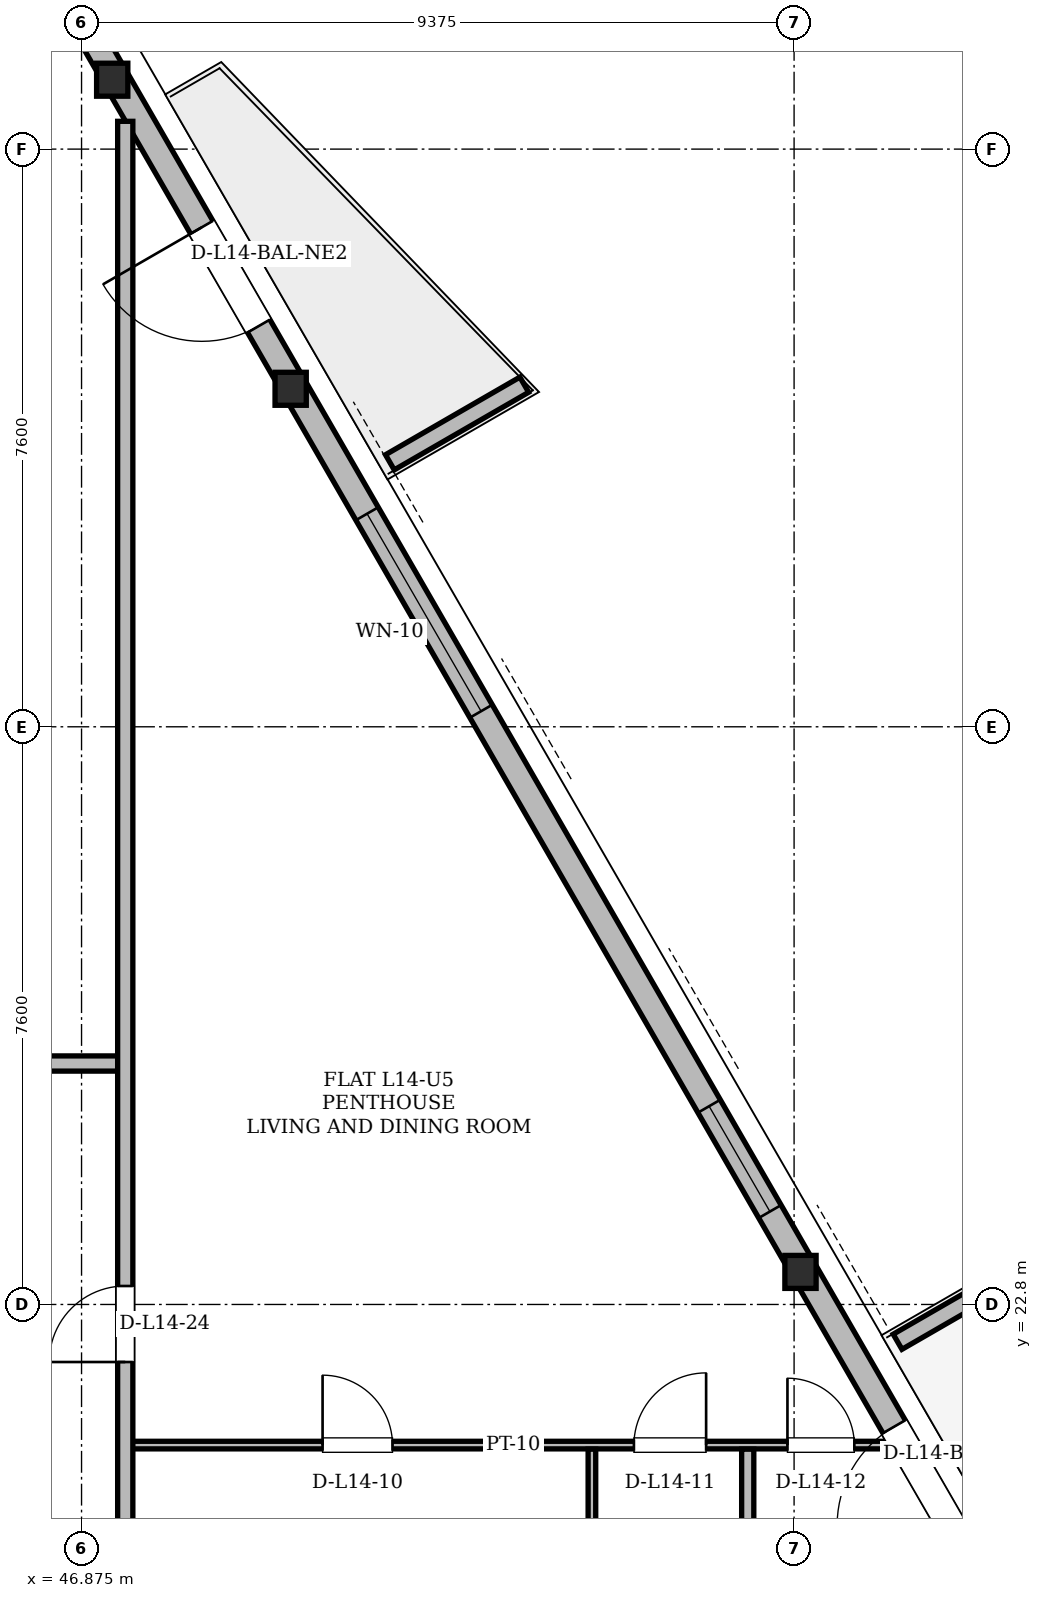
"""IFC4 building model, lengths in metres.
Left out: names, types, materials, properties, quantities, classifications, styles, units other than length and angle.
Written with IfcOpenShell. Run it as: python <this file> out.ifc"""

import sys

from ifc_helpers import new_model, si_unit, direction, frame, frame_2d, origin, origin_2d, place, context, subcontext, project, spatial, polyline, rectangle, i_section, outline, extrude, element, fill, save


model = new_model("IFC4")
c1 = context("Model", 3, precision=1e-05, world=origin(), true_north=direction((0.0, 1.0)))
c2 = subcontext(c1, "Body", "Model", "MODEL_VIEW")
j1 = project(units=[si_unit("LENGTHUNIT", "METRE"), si_unit("PLANEANGLEUNIT", "RADIAN")], contexts=[c1])
p1 = place(None, origin())
s1 = spatial("IfcSite", under=j1, at=p1, CompositionType="ELEMENT")
p2 = place(p1, origin())
s2 = spatial("IfcBuilding", under=s1, at=p2, CompositionType="ELEMENT")
p3 = place(p2, frame((0.0, 0.0, 56.1)))
s3 = spatial("IfcBuildingStorey", under=s2, at=p3, CompositionType="ELEMENT", Elevation=56.1)
for number, where, z_axis, x_axis in (
    (1, (56.372, 23.26, 0.004), (-0.021, -0.018, 1.0), (0.65, -0.76, 0.0)),
    (2, (49.673, 34.863, 0.004), (-0.026, -0.009, 1.0), (0.335, -0.942, 0.0)),
    (3, (47.329, 38.924, 0.004), (-0.028, -0.006, 1.0), (0.214, -0.977, 0.0)),
):
    element("IfcColumn", number, at=place(p3, frame(where, z_axis=z_axis, x_axis=x_axis)), inside=s3, PredefinedType="COLUMN", context=c2, shape_type="SweptSolid", body=[
        extrude(i_section(OverallWidth=0.411, OverallDepth=0.434, WebThickness=0.036, FlangeThickness=0.057, at=origin_2d()), origin(), (0.0, 0.0, 1.0), 3.593),
    ])
p4 = place(p3, frame((61.396, 14.559, 0.0), z_axis=(0.0, 0.0, 1.0), x_axis=(-0.500002389912, 0.866024023964, 0.0)))
e4 = element("IfcWall", 4, at=p4, inside=s3, PredefinedType="SOLIDWALL", context=c2, shape_type="SweptSolid", body=[
    extrude(rectangle(XDim=33.494, YDim=0.34, at=frame_2d((16.747, 0.0))), origin(), (0.0, 0.0, 1.0), 2.494),
])
p5 = place(p4, frame((6.159, 0.0, 0.0)))
e5 = element("IfcOpeningElement", 5, at=p5, cuts=e4, PredefinedType="OPENING", context=c2, shape_type="SweptSolid", body=[
    extrude(rectangle(XDim=1.5, YDim=2.2, at=frame_2d((0.75, 1.1))), frame((0.0, 0.17, 0.0), z_axis=(0.0, -1.0, 0.0), x_axis=(1.0, 0.0, 0.0)), (0.0, 0.0, 1.0), 0.34),
])
p6 = place(p4, frame((24.379, 0.0, 0.0)))
e6 = element("IfcOpeningElement", 6, at=p6, cuts=e4, PredefinedType="OPENING", context=c2, shape_type="SweptSolid", body=[
    extrude(rectangle(XDim=1.5, YDim=2.2, at=frame_2d((0.75, 1.1))), frame((0.0, 0.17, 0.0), z_axis=(0.0, -1.0, 0.0), x_axis=(1.0, 0.0, 0.0)), (0.0, 0.0, 1.0), 0.34),
])
p7 = place(p4, frame((0.92, 0.0, 0.85)))
e7 = element("IfcOpeningElement", 7, at=p7, cuts=e4, PredefinedType="OPENING", context=c2, shape_type="SweptSolid", body=[
    extrude(rectangle(XDim=1.2, YDim=1.48, at=frame_2d((0.6, 0.74))), frame((0.0, 0.17, 0.0), z_axis=(0.0, -1.0, 0.0), x_axis=(1.0, 0.0, 0.0)), (0.0, 0.0, 1.0), 0.34),
])
p8 = place(p4, frame((10.928, 0.0, 0.85)))
e8 = element("IfcOpeningElement", 8, at=p8, cuts=e4, PredefinedType="OPENING", context=c2, shape_type="SweptSolid", body=[
    extrude(rectangle(XDim=1.6, YDim=1.534, at=frame_2d((0.8, 0.767))), frame((0.0, 0.17, 0.0), z_axis=(0.0, -1.0, 0.0), x_axis=(1.0, 0.0, 0.0)), (0.0, 0.0, 1.0), 0.34),
])
p9 = place(p4, frame((18.529, 0.0, 0.85)))
e9 = element("IfcOpeningElement", 9, at=p9, cuts=e4, PredefinedType="OPENING", context=c2, shape_type="SweptSolid", body=[
    extrude(rectangle(XDim=3.0, YDim=1.534, at=frame_2d((1.5, 0.767))), frame((0.0, 0.17, 0.0), z_axis=(0.0, -1.0, 0.0), x_axis=(1.0, 0.0, 0.0)), (0.0, 0.0, 1.0), 0.34),
])
p10 = place(p4, frame((3.162, 0.0, 0.85)))
e10 = element("IfcOpeningElement", 10, at=p10, cuts=e4, PredefinedType="OPENING", context=c2, shape_type="SweptSolid", body=[
    extrude(rectangle(XDim=1.2, YDim=1.48, at=frame_2d((0.6, 0.74))), frame((0.0, 0.17, 0.0), z_axis=(0.0, -1.0, 0.0), x_axis=(1.0, 0.0, 0.0)), (0.0, 0.0, 1.0), 0.34),
])
for number, where, z_axis, x_axis in (
    (11, (57.612, 22.309, 0.0), (0.0, 0.0, 1.0), (0.866, 0.5, 0.0)),
    (12, (50.932, 33.879, 0.0), (0.0, 0.0, 1.0), (0.866, 0.5, 0.0)),
):
    element("IfcWall", number, at=place(p3, frame(where, z_axis=z_axis, x_axis=x_axis)), inside=s3, PredefinedType="PARAPET", context=c2, shape_type="SweptSolid", body=[
        extrude(outline(polyline([(0.0, 0.0), (2.042, 0.0), (2.042, 1.1), (0.0, 1.32), (0.0, 0.0)])), frame((0.0, 0.115, 0.0), z_axis=(0.0, -1.0, 0.0), x_axis=(1.0, 0.0, 0.0)), (0.0, 0.0, 1.0), 0.23),
    ])
p11 = place(p3, frame((47.4, 20.95, 0.0), z_axis=(0.0, 0.0, 1.0), x_axis=(1.0, 0.0, 0.0)))
e13 = element("IfcWall", 13, at=p11, inside=s3, PredefinedType="PARTITIONING", context=c2, shape_type="SweptSolid", body=[
    extrude(rectangle(XDim=10.105, YDim=0.1, at=frame_2d((5.052, 0.0))), origin(), (0.0, 0.0, 1.0), 3.36),
])
p12 = place(p11, frame((2.646, 0.0, 0.0)))
e14 = element("IfcOpeningElement", 14, at=p12, cuts=e13, PredefinedType="OPENING", context=c2, shape_type="SweptSolid", body=[
    extrude(rectangle(XDim=0.92, YDim=2.12, at=frame_2d((0.46, 1.06))), frame((0.0, 0.05, 0.0), z_axis=(0.0, -1.0, 0.0), x_axis=(1.0, 0.0, 0.0)), (0.0, 0.0, 1.0), 0.1),
])
p13 = place(p11, frame((6.743, 0.0, 0.0)))
e15 = element("IfcOpeningElement", 15, at=p13, cuts=e13, PredefinedType="OPENING", context=c2, shape_type="SweptSolid", body=[
    extrude(rectangle(XDim=0.95, YDim=2.1, at=frame_2d((0.475, 1.05))), frame((0.0, 0.05, 0.0), z_axis=(0.0, -1.0, 0.0), x_axis=(1.0, 0.0, 0.0)), (0.0, 0.0, 1.0), 0.1),
])
p14 = place(p11, frame((8.763, 0.0, 0.0)))
e16 = element("IfcOpeningElement", 16, at=p14, cuts=e13, PredefinedType="OPENING", context=c2, shape_type="SweptSolid", body=[
    extrude(rectangle(XDim=0.88, YDim=2.08, at=frame_2d((0.44, 1.04))), frame((0.0, 0.05, 0.0), z_axis=(0.0, -1.0, 0.0), x_axis=(1.0, 0.0, 0.0)), (0.0, 0.0, 1.0), 0.1),
])
p15 = place(p3, frame((27.55, 25.97, 0.0), z_axis=(0.0, 0.0, 1.0), x_axis=(1.0, 0.0, 0.0)))
e17 = element("IfcWall", 17, at=p15, inside=s3, PredefinedType="PARTITIONING", context=c2, shape_type="SweptSolid", body=[
    extrude(rectangle(XDim=19.9, YDim=0.2, at=frame_2d((9.95, 0.0))), origin(), (0.0, 0.0, 1.0), 2.738),
])
p16 = place(p15, frame((2.077, 0.0, 0.0)))
e18 = element("IfcOpeningElement", 18, at=p16, cuts=e17, PredefinedType="OPENING", context=c2, shape_type="SweptSolid", body=[
    extrude(rectangle(XDim=1.0, YDim=2.18, at=frame_2d((0.5, 1.09))), frame((0.0, 0.1, 0.0), z_axis=(0.0, -1.0, 0.0), x_axis=(1.0, 0.0, 0.0)), (0.0, 0.0, 1.0), 0.2),
])
p17 = place(p15, frame((7.8, 0.0, 0.0)))
e19 = element("IfcOpeningElement", 19, at=p17, cuts=e17, PredefinedType="OPENING", context=c2, shape_type="SweptSolid", body=[
    extrude(rectangle(XDim=1.3, YDim=2.2, at=frame_2d((0.65, 1.1))), frame((0.0, 0.1, 0.0), z_axis=(0.0, -1.0, 0.0), x_axis=(1.0, 0.0, 0.0)), (0.0, 0.0, 1.0), 0.2),
])
p18 = place(p3, frame((47.45, 11.054, 0.0), z_axis=(0.0, 0.0, 1.0), x_axis=(0.0, 1.0, 0.0)))
e20 = element("IfcWall", 20, at=p18, inside=s3, PredefinedType="PARTITIONING", context=c2, shape_type="SweptSolid", body=[
    extrude(rectangle(XDim=27.312, YDim=0.2, at=frame_2d((13.656, 0.0))), origin(), (0.0, 0.0, 1.0), 2.494),
])
p19 = place(p18, frame((10.989, 0.0, 0.0)))
e21 = element("IfcOpeningElement", 21, at=p19, cuts=e20, PredefinedType="OPENING", context=c2, shape_type="SweptSolid", body=[
    extrude(rectangle(XDim=1.0, YDim=2.18, at=frame_2d((0.5, 1.09))), frame((0.0, 0.1, 0.0), z_axis=(0.0, -1.0, 0.0), x_axis=(1.0, 0.0, 0.0)), (0.0, 0.0, 1.0), 0.2),
])
p20 = place(p3, frame((53.59, 16.704, 0.0), z_axis=(0.0, 0.0, 1.0), x_axis=(0.0, 1.0, 0.0)))
e22 = element("IfcWall", 22, at=p20, inside=s3, PredefinedType="PARTITIONING", context=c2, shape_type="SweptSolid", body=[
    extrude(rectangle(XDim=4.192, YDim=0.1, at=frame_2d((2.096, 0.0))), origin(), (0.0, 0.0, 1.0), 3.36),
])
p21 = place(p3, frame((55.64, 16.704, 0.0), z_axis=(0.0, 0.0, 1.0), x_axis=(0.0, 1.0, 0.0)))
e23 = element("IfcWall", 23, at=p21, inside=s3, PredefinedType="PARTITIONING", context=c2, shape_type="SweptSolid", body=[
    extrude(rectangle(XDim=4.192, YDim=0.16, at=frame_2d((2.096, 0.0))), origin(), (0.0, 0.0, 1.0), 2.946),
])
p22 = place(p5, origin())
e24 = element("IfcDoor", 24, at=p22, inside=s3, OperationType="SINGLE_SWING_LEFT", PredefinedType="DOOR", context=c2, shape_type="SweptSolid", body=[
    extrude(rectangle(XDim=1.5, YDim=2.2, at=frame_2d((0.75, 1.1))), frame((0.0, 0.025, 0.0), z_axis=(0.0, -1.0, 0.0), x_axis=(1.0, 0.0, 0.0)), (0.0, 0.0, 1.0), 0.05),
])
fill(e5, e24)
p23 = place(p6, origin())
e25 = element("IfcDoor", 25, at=p23, inside=s3, OperationType="SINGLE_SWING_RIGHT", PredefinedType="DOOR", context=c2, shape_type="SweptSolid", body=[
    extrude(rectangle(XDim=1.5, YDim=2.2, at=frame_2d((0.75, 1.1))), frame((0.0, 0.025, 0.0), z_axis=(0.0, -1.0, 0.0), x_axis=(1.0, 0.0, 0.0)), (0.0, 0.0, 1.0), 0.05),
])
fill(e6, e25)
p24 = place(p8, origin())
e26 = element("IfcWindow", 26, at=p24, inside=s3, PartitioningType="SINGLE_PANEL", PredefinedType="WINDOW", context=c2, shape_type="SweptSolid", body=[
    extrude(rectangle(XDim=1.6, YDim=1.534, at=frame_2d((0.8, 0.767))), frame((0.0, 0.03, 0.0), z_axis=(0.0, -1.0, 0.0), x_axis=(1.0, 0.0, 0.0)), (0.0, 0.0, 1.0), 0.06),
])
fill(e8, e26)
p25 = place(p9, origin())
e27 = element("IfcWindow", 27, at=p25, inside=s3, PartitioningType="SINGLE_PANEL", PredefinedType="WINDOW", context=c2, shape_type="SweptSolid", body=[
    extrude(rectangle(XDim=3.0, YDim=1.534, at=frame_2d((1.5, 0.767))), frame((0.0, 0.03, 0.0), z_axis=(0.0, -1.0, 0.0), x_axis=(1.0, 0.0, 0.0)), (0.0, 0.0, 1.0), 0.06),
])
fill(e9, e27)
p26 = place(p12, origin())
e28 = element("IfcDoor", 28, at=p26, inside=s3, OperationType="SINGLE_SWING_LEFT", PredefinedType="DOOR", context=c2, shape_type="SweptSolid", body=[
    extrude(rectangle(XDim=0.92, YDim=2.12, at=frame_2d((0.46, 1.06))), frame((0.0, 0.025, 0.0), z_axis=(0.0, -1.0, 0.0), x_axis=(1.0, 0.0, 0.0)), (0.0, 0.0, 1.0), 0.05),
])
fill(e14, e28)
p27 = place(p13, origin())
e29 = element("IfcDoor", 29, at=p27, inside=s3, OperationType="SINGLE_SWING_RIGHT", PredefinedType="DOOR", context=c2, shape_type="SweptSolid", body=[
    extrude(rectangle(XDim=0.95, YDim=2.1, at=frame_2d((0.475, 1.05))), frame((0.0, 0.025, 0.0), z_axis=(0.0, -1.0, 0.0), x_axis=(1.0, 0.0, 0.0)), (0.0, 0.0, 1.0), 0.05),
])
fill(e15, e29)
p28 = place(p14, origin())
e30 = element("IfcDoor", 30, at=p28, inside=s3, OperationType="SINGLE_SWING_LEFT", PredefinedType="DOOR", context=c2, shape_type="SweptSolid", body=[
    extrude(rectangle(XDim=0.88, YDim=2.08, at=frame_2d((0.44, 1.04))), frame((0.0, 0.025, 0.0), z_axis=(0.0, -1.0, 0.0), x_axis=(1.0, 0.0, 0.0)), (0.0, 0.0, 1.0), 0.05),
])
fill(e16, e30)
p29 = place(p19, origin())
e31 = element("IfcDoor", 31, at=p29, inside=s3, OperationType="SINGLE_SWING_LEFT", PredefinedType="DOOR", context=c2, shape_type="SweptSolid", body=[
    extrude(rectangle(XDim=1.0, YDim=2.18, at=frame_2d((0.5, 1.09))), frame((0.0, 0.025, 0.0), z_axis=(0.0, -1.0, 0.0), x_axis=(1.0, 0.0, 0.0)), (0.0, 0.0, 1.0), 0.05),
])
fill(e21, e31)
save(model, sys.argv[1])
